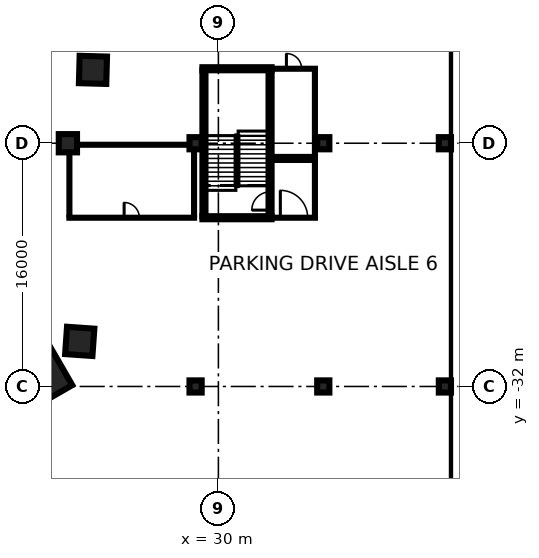
"""IFC4 building model, lengths in metres.
Left out: names, types, materials, properties, quantities, classifications, styles, units other than length and angle.
Written with IfcOpenShell. Run it as: python <this file> out.ifc"""

import sys

from ifc_helpers import new_model, si_unit, direction, frame, frame_2d, origin, origin_2d, place, context, subcontext, project, spatial, rectangle, extrude, element, fill, save


model = new_model("IFC4")
c1 = context("Model", 3, precision=1e-05, world=origin(), true_north=direction((0.0, 1.0)))
c2 = subcontext(c1, "Body", "Model", "MODEL_VIEW")
j1 = project(units=[si_unit("LENGTHUNIT", "METRE"), si_unit("PLANEANGLEUNIT", "RADIAN")], contexts=[c1])
p1 = place(None, origin())
s1 = spatial("IfcSite", under=j1, at=p1, CompositionType="ELEMENT")
p2 = place(p1, origin())
s2 = spatial("IfcBuilding", under=s1, at=p2, CompositionType="ELEMENT")
p3 = place(p2, frame((0.0, 0.0, -12.0)))
s3 = spatial("IfcBuildingStorey", under=s2, at=p3, CompositionType="ELEMENT", Elevation=-12.0)
p4 = place(p3, frame((45.75, -80.0, 0.0), z_axis=(0.0, 0.0, 1.0), x_axis=(0.0, 1.0, 0.0)))
e1 = element("IfcWall", 1, at=p4, inside=s3, PredefinedType="USERDEFINED", context=c2, shape_type="SweptSolid", body=[
    extrude(rectangle(XDim=160.0, YDim=0.9, at=frame_2d((80.0, 0.0))), origin(), (0.0, 0.0, 1.0), 11.55),
])
p5 = place(p2, frame((0.0, 0.0, -3.6)))
s4 = spatial("IfcBuildingStorey", under=s2, at=p5, CompositionType="ELEMENT", Elevation=-3.6)
p6 = place(p5, frame((17.865, -30.942, -0.4), z_axis=(0.0, 0.0, 1.0), x_axis=(-0.5, 0.866025403784, 0.0)))
e2 = element("IfcColumn", 2, at=p6, inside=s4, PredefinedType="COLUMN", context=c2, shape_type="SweptSolid", body=[
    extrude(rectangle(XDim=4.2, YDim=3.4, at=origin_2d()), origin(), (0.0, 0.0, 1.0), 3.55),
])
for number, where, z_axis, x_axis in (
    (3, (20.879, -29.034, -0.4), (0.0, 0.0, 1.0), (-0.998, 0.07, 0.0)),
    (4, (21.749, -11.174, -0.4), (0.0, 0.0, 1.0), (-1.0, 0.027, 0.0)),
):
    element("IfcColumn", number, at=place(p5, frame(where, z_axis=z_axis, x_axis=x_axis)), inside=s4, PredefinedType="COLUMN", context=c2, shape_type="SweptSolid", body=[
        extrude(rectangle(XDim=1.8, YDim=1.8, at=origin_2d()), origin(), (0.0, 0.0, 1.0), 3.55),
    ])
p7 = place(p5, frame((20.1, -16.0, -0.4), z_axis=(0.0, 0.0, 1.0), x_axis=(1.0, 0.0, 0.0)))
e5 = element("IfcColumn", 5, at=p7, inside=s4, PredefinedType="COLUMN", context=c2, shape_type="SweptSolid", body=[
    extrude(rectangle(XDim=1.2, YDim=1.2, at=origin_2d()), origin(), (0.0, 0.0, 1.0), 3.55),
])
for number, where, z_axis, x_axis in (
    (6, (28.5, -32.0, -0.4), (0.0, 0.0, 1.0), (1.0, 0.0, 0.0)),
    (7, (28.5, -16.0, -0.4), (0.0, 0.0, 1.0), (1.0, 0.0, 0.0)),
    (8, (36.9, -32.0, -0.4), (0.0, 0.0, 1.0), (1.0, 0.0, 0.0)),
    (9, (36.9, -16.0, -0.4), (0.0, 0.0, 1.0), (1.0, 0.0, 0.0)),
    (10, (44.9, -32.0, -0.4), (0.0, 0.0, 1.0), (1.0, 0.0, 0.0)),
    (11, (44.9, -16.0, -0.4), (0.0, 0.0, 1.0), (1.0, 0.0, 0.0)),
):
    element("IfcColumn", number, at=place(p5, frame(where, z_axis=z_axis, x_axis=x_axis)), inside=s4, PredefinedType="COLUMN", context=c2, shape_type="SweptSolid", body=[
        extrude(rectangle(XDim=0.8, YDim=0.8, at=origin_2d()), origin(), (0.0, 0.0, 1.0), 3.55),
    ])
p8 = place(p5, frame((20.1, -20.9, 0.0), z_axis=(0.0, 0.0, 1.0), x_axis=(1.0, 0.0, 0.0)))
e12 = element("IfcWall", 12, at=p8, inside=s4, PredefinedType="PARTITIONING", context=c2, shape_type="SweptSolid", body=[
    extrude(rectangle(XDim=8.4, YDim=0.2, at=frame_2d((4.2, 0.0))), origin(), (0.0, 0.0, 1.0), 3.15),
])
p9 = place(p8, frame((3.7, 0.0, 0.0)))
e13 = element("IfcOpeningElement", 13, at=p9, cuts=e12, PredefinedType="OPENING", context=c2, shape_type="SweptSolid", body=[
    extrude(rectangle(XDim=1.0, YDim=2.1, at=frame_2d((0.5, 1.05))), frame((0.0, 0.11, 0.0), z_axis=(0.0, -1.0, 0.0), x_axis=(1.0, 0.0, 0.0)), (0.0, 0.0, 1.0), 0.22),
])
p10 = place(p5, frame((20.1, -16.1, 0.0), z_axis=(0.0, 0.0, 1.0), x_axis=(1.0, 0.0, 0.0)))
e14 = element("IfcWall", 14, at=p10, inside=s4, PredefinedType="PARTITIONING", context=c2, shape_type="SweptSolid", body=[
    extrude(rectangle(XDim=8.4, YDim=0.2, at=frame_2d((4.2, 0.0))), origin(), (0.0, 0.0, 1.0), 3.15),
])
p11 = place(p5, frame((20.2, -20.8, 0.0), z_axis=(0.0, 0.0, 1.0), x_axis=(0.0, 1.0, 0.0)))
e15 = element("IfcWall", 15, at=p11, inside=s4, PredefinedType="PARTITIONING", context=c2, shape_type="SweptSolid", body=[
    extrude(rectangle(XDim=4.2, YDim=0.2, at=frame_2d((2.1, 0.0))), origin(), (0.0, 0.0, 1.0), 3.15),
])
p12 = place(p5, frame((28.4, -20.8, 0.0), z_axis=(0.0, 0.0, 1.0), x_axis=(0.0, 1.0, 0.0)))
e16 = element("IfcWall", 16, at=p12, inside=s4, PredefinedType="PARTITIONING", context=c2, shape_type="SweptSolid", body=[
    extrude(rectangle(XDim=4.4, YDim=0.2, at=frame_2d((2.2, 0.0))), origin(), (0.0, 0.0, 1.0), 3.15),
])
p13 = place(p5, frame((33.5, -20.9, 0.0), z_axis=(0.0, 0.0, 1.0), x_axis=(1.0, 0.0, 0.0)))
e17 = element("IfcWall", 17, at=p13, inside=s4, PredefinedType="PARTITIONING", context=c2, shape_type="SweptSolid", body=[
    extrude(rectangle(XDim=2.95, YDim=0.2, at=frame_2d((1.475, 0.0))), origin(), (0.0, 0.0, 1.0), 3.15),
])
p14 = place(p13, frame((0.575, 0.0, 0.0)))
e18 = element("IfcOpeningElement", 18, at=p14, cuts=e17, PredefinedType="OPENING", context=c2, shape_type="SweptSolid", body=[
    extrude(rectangle(XDim=1.8, YDim=2.1, at=frame_2d((0.9, 1.05))), frame((0.0, 0.11, 0.0), z_axis=(0.0, -1.0, 0.0), x_axis=(1.0, 0.0, 0.0)), (0.0, 0.0, 1.0), 0.22),
])
p15 = place(p5, frame((33.5, -17.1, 0.0), z_axis=(0.0, 0.0, 1.0), x_axis=(1.0, 0.0, 0.0)))
e19 = element("IfcWall", 19, at=p15, inside=s4, PredefinedType="PARTITIONING", context=c2, shape_type="SweptSolid", body=[
    extrude(rectangle(XDim=2.95, YDim=0.2, at=frame_2d((1.475, 0.0))), origin(), (0.0, 0.0, 1.0), 3.15),
])
p16 = place(p5, frame((36.35, -20.8, 0.0), z_axis=(0.0, 0.0, 1.0), x_axis=(0.0, 1.0, 0.0)))
e20 = element("IfcWall", 20, at=p16, inside=s4, PredefinedType="PARTITIONING", context=c2, shape_type="SweptSolid", body=[
    extrude(rectangle(XDim=3.6, YDim=0.2, at=frame_2d((1.8, 0.0))), origin(), (0.0, 0.0, 1.0), 3.15),
])
p17 = place(p5, frame((33.5, -16.9, 0.0), z_axis=(0.0, 0.0, 1.0), x_axis=(1.0, 0.0, 0.0)))
e21 = element("IfcWall", 21, at=p17, inside=s4, PredefinedType="PARTITIONING", context=c2, shape_type="SweptSolid", body=[
    extrude(rectangle(XDim=2.95, YDim=0.2, at=frame_2d((1.475, 0.0))), origin(), (0.0, 0.0, 1.0), 3.15),
])
p18 = place(p5, frame((33.5, -11.1, 0.0), z_axis=(0.0, 0.0, 1.0), x_axis=(1.0, 0.0, 0.0)))
e22 = element("IfcWall", 22, at=p18, inside=s4, PredefinedType="PARTITIONING", context=c2, shape_type="SweptSolid", body=[
    extrude(rectangle(XDim=2.95, YDim=0.2, at=frame_2d((1.475, 0.0))), origin(), (0.0, 0.0, 1.0), 3.15),
])
p19 = place(p18, frame((0.975, 0.0, 0.0)))
e23 = element("IfcOpeningElement", 23, at=p19, cuts=e22, PredefinedType="OPENING", context=c2, shape_type="SweptSolid", body=[
    extrude(rectangle(XDim=1.0, YDim=2.1, at=frame_2d((0.5, 1.05))), frame((0.0, 0.11, 0.0), z_axis=(0.0, -1.0, 0.0), x_axis=(1.0, 0.0, 0.0)), (0.0, 0.0, 1.0), 0.22),
])
p20 = place(p5, frame((36.35, -16.8, 0.0), z_axis=(0.0, 0.0, 1.0), x_axis=(0.0, 1.0, 0.0)))
e24 = element("IfcWall", 24, at=p20, inside=s4, PredefinedType="PARTITIONING", context=c2, shape_type="SweptSolid", body=[
    extrude(rectangle(XDim=5.6, YDim=0.2, at=frame_2d((2.8, 0.0))), origin(), (0.0, 0.0, 1.0), 3.15),
])
p21 = place(p5, frame((29.05, -20.8, 0.0), z_axis=(0.0, 0.0, 1.0), x_axis=(0.0, 1.0, 0.0)))
e25 = element("IfcWall", 25, at=p21, inside=s4, PredefinedType="SOLIDWALL", context=c2, shape_type="SweptSolid", body=[
    extrude(rectangle(XDim=9.6, YDim=0.2, at=frame_2d((4.8, 0.0))), origin(), (0.0, 0.0, 1.0), 3.15),
])
p22 = place(p5, frame((33.4, -20.8, 0.0), z_axis=(0.0, 0.0, 1.0), x_axis=(0.0, 1.0, 0.0)))
e26 = element("IfcWall", 26, at=p22, inside=s4, PredefinedType="SOLIDWALL", context=c2, shape_type="SweptSolid", body=[
    extrude(rectangle(XDim=9.6, YDim=0.2, at=frame_2d((4.8, 0.0))), origin(), (0.0, 0.0, 1.0), 3.15),
])
p23 = place(p22, frame((0.4, 0.0, 0.0)))
e27 = element("IfcOpeningElement", 27, at=p23, cuts=e26, PredefinedType="OPENING", context=c2, shape_type="SweptSolid", body=[
    extrude(rectangle(XDim=1.2, YDim=2.1, at=frame_2d((0.6, 1.05))), frame((0.0, 0.11, 0.0), z_axis=(0.0, -1.0, 0.0), x_axis=(1.0, 0.0, 0.0)), (0.0, 0.0, 1.0), 0.22),
])
for number, where, z_axis, x_axis in (
    (28, (33.5, -20.9, 0.0), (0.0, 0.0, 1.0), (-1.0, 0.0, 0.0)),
    (29, (28.95, -11.1, 0.0), (0.0, 0.0, 1.0), (1.0, 0.0, 0.0)),
):
    element("IfcWall", number, at=place(p5, frame(where, z_axis=z_axis, x_axis=x_axis)), inside=s4, PredefinedType="SOLIDWALL", context=c2, shape_type="SweptSolid", body=[
        extrude(rectangle(XDim=4.55, YDim=0.2, at=frame_2d((2.275, 0.0))), origin(), (0.0, 0.0, 1.0), 3.15),
    ])
p24 = place(p9, origin())
e30 = element("IfcDoor", 30, at=p24, inside=s4, OperationType="SINGLE_SWING_LEFT", PredefinedType="DOOR", context=c2, shape_type="SweptSolid", body=[
    extrude(rectangle(XDim=1.0, YDim=2.1, at=frame_2d((0.5, 1.05))), frame((0.0, 0.025, 0.0), z_axis=(0.0, -1.0, 0.0), x_axis=(1.0, 0.0, 0.0)), (0.0, 0.0, 1.0), 0.05),
])
fill(e13, e30)
p25 = place(p14, origin())
e31 = element("IfcDoor", 31, at=p25, inside=s4, OperationType="DOUBLE_DOOR_SINGLE_SWING", PredefinedType="DOOR", context=c2, shape_type="SweptSolid", body=[
    extrude(rectangle(XDim=1.8, YDim=2.1, at=frame_2d((0.9, 1.05))), frame((0.0, 0.025, 0.0), z_axis=(0.0, -1.0, 0.0), x_axis=(1.0, 0.0, 0.0)), (0.0, 0.0, 1.0), 0.05),
])
fill(e18, e31)
p26 = place(p19, origin())
e32 = element("IfcDoor", 32, at=p26, inside=s4, OperationType="SINGLE_SWING_LEFT", PredefinedType="DOOR", context=c2, shape_type="SweptSolid", body=[
    extrude(rectangle(XDim=1.0, YDim=2.1, at=frame_2d((0.5, 1.05))), frame((0.0, 0.025, 0.0), z_axis=(0.0, -1.0, 0.0), x_axis=(1.0, 0.0, 0.0)), (0.0, 0.0, 1.0), 0.05),
])
fill(e23, e32)
p27 = place(p23, origin())
e33 = element("IfcDoor", 33, at=p27, inside=s4, OperationType="SINGLE_SWING_LEFT", PredefinedType="DOOR", context=c2, shape_type="SweptSolid", body=[
    extrude(rectangle(XDim=1.2, YDim=2.1, at=frame_2d((0.6, 1.05))), frame((0.0, 0.025, 0.0), z_axis=(0.0, -1.0, 0.0), x_axis=(1.0, 0.0, 0.0)), (0.0, 0.0, 1.0), 0.05),
])
fill(e27, e33)
save(model, sys.argv[1])
